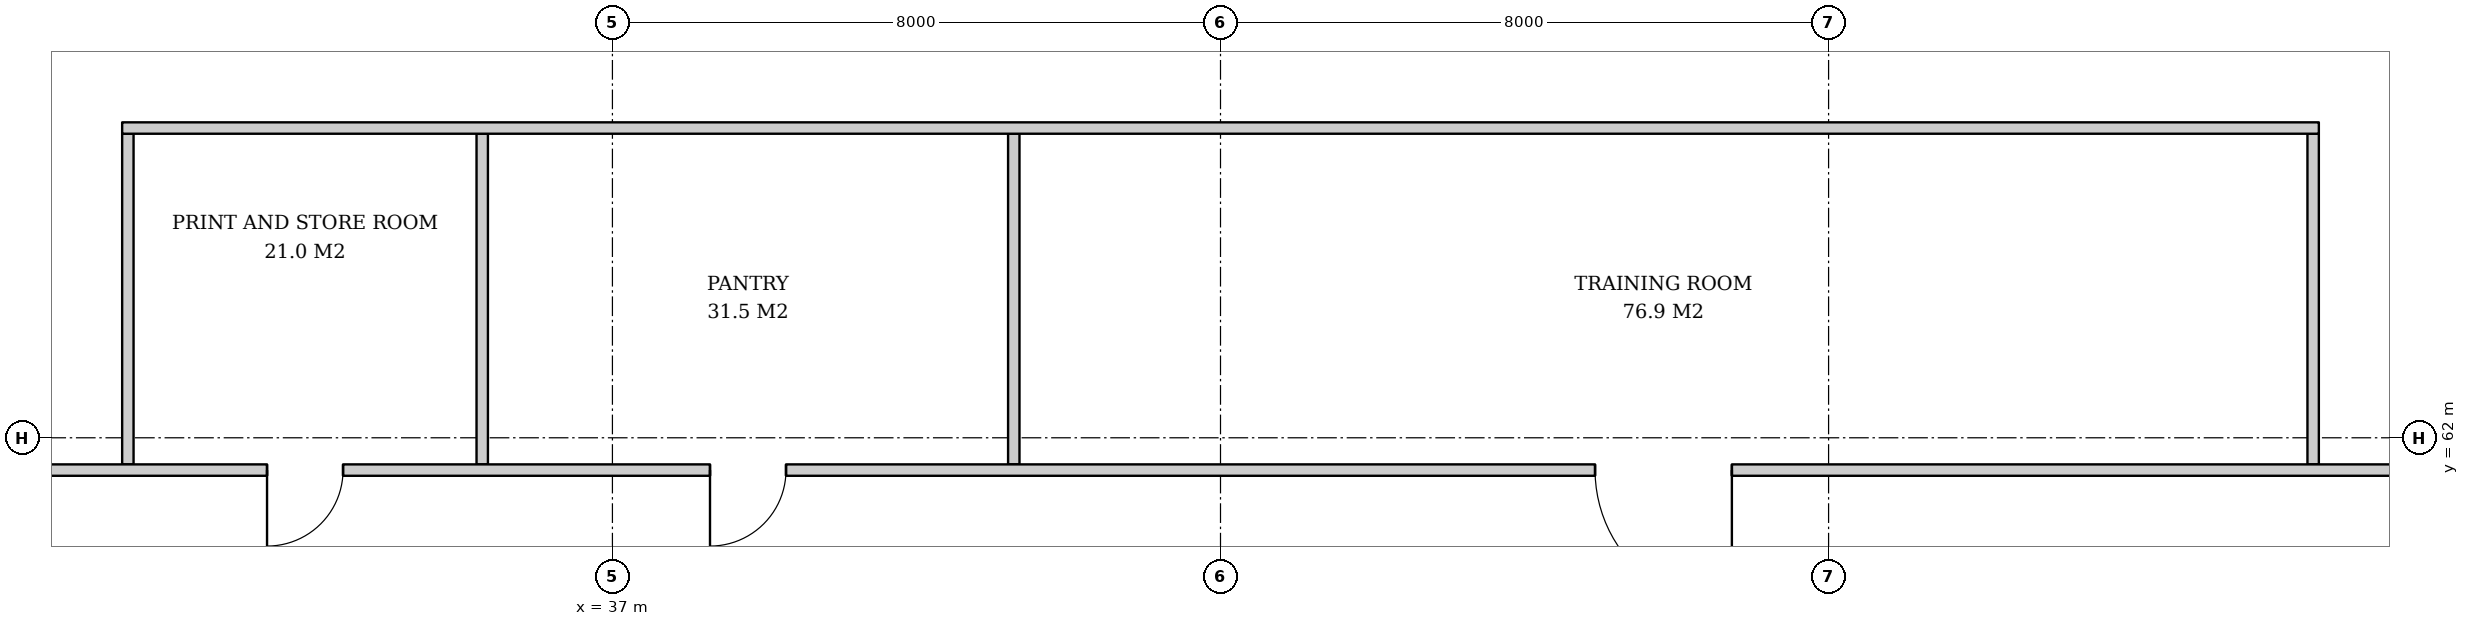
"""IFC4 building model, lengths in metres.
Left out: names, types, materials, properties, quantities, classifications, styles, units other than length and angle.
Written with IfcOpenShell. Run it as: python <this file> out.ifc"""

import sys

from ifc_helpers import new_model, si_unit, direction, frame, frame_2d, origin, place, context, subcontext, project, spatial, rectangle, extrude, element, fill, save


model = new_model("IFC4")
c1 = context("Model", 3, precision=1e-05, world=origin(), true_north=direction((0.0, 1.0)))
c2 = subcontext(c1, "Body", "Model", "MODEL_VIEW")
j1 = project(units=[si_unit("LENGTHUNIT", "METRE"), si_unit("PLANEANGLEUNIT", "RADIAN")], contexts=[c1])
p1 = place(None, origin())
s1 = spatial("IfcSite", under=j1, at=p1, CompositionType="ELEMENT")
p2 = place(p1, origin())
s2 = spatial("IfcBuilding", under=s1, at=p2, CompositionType="ELEMENT")
p3 = place(p2, frame((0.0, 0.0, 32.4)))
s3 = spatial("IfcBuildingStorey", under=s2, at=p3, CompositionType="ELEMENT", Elevation=32.4)
for number, where, z_axis, x_axis in (
    (1, (59.375, 61.65, 0.0), (0.0, 0.0, 1.0), (0.0, 1.0, 0.0)),
    (2, (42.281, 61.65, 0.0), (0.0, 0.0, 1.0), (0.0, 1.0, 0.0)),
    (3, (35.287, 61.65, 0.0), (0.0, 0.0, 1.0), (0.0, 1.0, 0.0)),
    (4, (30.625, 61.65, 0.0), (0.0, 0.0, 1.0), (0.0, 1.0, 0.0)),
):
    element("IfcWall", number, at=place(p3, frame(where, z_axis=z_axis, x_axis=x_axis)), inside=s3, PredefinedType="PARTITIONING", context=c2, shape_type="SweptSolid", body=[
        extrude(rectangle(XDim=4.35, YDim=0.15, at=frame_2d((2.175, 0.0))), origin(), (0.0, 0.0, 1.0), 3.62),
    ])
p4 = place(p3, frame((59.45, 66.075, 0.0), z_axis=(0.0, 0.0, 1.0), x_axis=(-1.0, 0.0, 0.0)))
e5 = element("IfcWall", 5, at=p4, inside=s3, PredefinedType="PARTITIONING", context=c2, shape_type="SweptSolid", body=[
    extrude(rectangle(XDim=28.9, YDim=0.15, at=frame_2d((14.45, 0.0))), origin(), (0.0, 0.0, 1.0), 2.612),
])
p5 = place(p3, frame((60.65, 61.575, 0.0), z_axis=(0.0, 0.0, 1.0), x_axis=(-1.0, 0.0, 0.0)))
e6 = element("IfcWall", 6, at=p5, inside=s3, PredefinedType="PARTITIONING", context=c2, shape_type="SweptSolid", body=[
    extrude(rectangle(XDim=31.15, YDim=0.15, at=frame_2d((15.575, 0.0))), origin(), (0.0, 0.0, 1.0), 2.612),
])
p6 = place(p5, frame((8.922, 0.0, 0.0)))
e7 = element("IfcOpeningElement", 7, at=p6, cuts=e6, PredefinedType="OPENING", context=c2, shape_type="SweptSolid", body=[
    extrude(rectangle(XDim=1.8, YDim=2.4, at=frame_2d((0.9, 1.2))), frame((0.0, 0.085, 0.0), z_axis=(0.0, -1.0, 0.0), x_axis=(1.0, 0.0, 0.0)), (0.0, 0.0, 1.0), 0.17),
])
p7 = place(p5, frame((21.366, 0.0, 0.0)))
e8 = element("IfcOpeningElement", 8, at=p7, cuts=e6, PredefinedType="OPENING", context=c2, shape_type="SweptSolid", body=[
    extrude(rectangle(XDim=1.0, YDim=2.1, at=frame_2d((0.5, 1.05))), frame((0.0, 0.085, 0.0), z_axis=(0.0, -1.0, 0.0), x_axis=(1.0, 0.0, 0.0)), (0.0, 0.0, 1.0), 0.17),
])
p8 = place(p5, frame((27.194, 0.0, 0.0)))
e9 = element("IfcOpeningElement", 9, at=p8, cuts=e6, PredefinedType="OPENING", context=c2, shape_type="SweptSolid", body=[
    extrude(rectangle(XDim=1.0, YDim=2.1, at=frame_2d((0.5, 1.05))), frame((0.0, 0.085, 0.0), z_axis=(0.0, -1.0, 0.0), x_axis=(1.0, 0.0, 0.0)), (0.0, 0.0, 1.0), 0.17),
])
p9 = place(p6, origin())
e10 = element("IfcDoor", 10, at=p9, inside=s3, OperationType="DOUBLE_DOOR_SINGLE_SWING", PredefinedType="DOOR", context=c2, shape_type="SweptSolid", body=[
    extrude(rectangle(XDim=1.8, YDim=2.4, at=frame_2d((0.9, 1.2))), frame((0.0, 0.025, 0.0), z_axis=(0.0, -1.0, 0.0), x_axis=(1.0, 0.0, 0.0)), (0.0, 0.0, 1.0), 0.05),
])
fill(e7, e10)
p10 = place(p7, origin())
e11 = element("IfcDoor", 11, at=p10, inside=s3, OperationType="SINGLE_SWING_RIGHT", PredefinedType="DOOR", context=c2, shape_type="SweptSolid", body=[
    extrude(rectangle(XDim=1.0, YDim=2.1, at=frame_2d((0.5, 1.05))), frame((0.0, 0.025, 0.0), z_axis=(0.0, -1.0, 0.0), x_axis=(1.0, 0.0, 0.0)), (0.0, 0.0, 1.0), 0.05),
])
fill(e8, e11)
p11 = place(p8, origin())
e12 = element("IfcDoor", 12, at=p11, inside=s3, OperationType="SINGLE_SWING_RIGHT", PredefinedType="DOOR", context=c2, shape_type="SweptSolid", body=[
    extrude(rectangle(XDim=1.0, YDim=2.1, at=frame_2d((0.5, 1.05))), frame((0.0, 0.025, 0.0), z_axis=(0.0, -1.0, 0.0), x_axis=(1.0, 0.0, 0.0)), (0.0, 0.0, 1.0), 0.05),
])
fill(e9, e12)
save(model, sys.argv[1])
